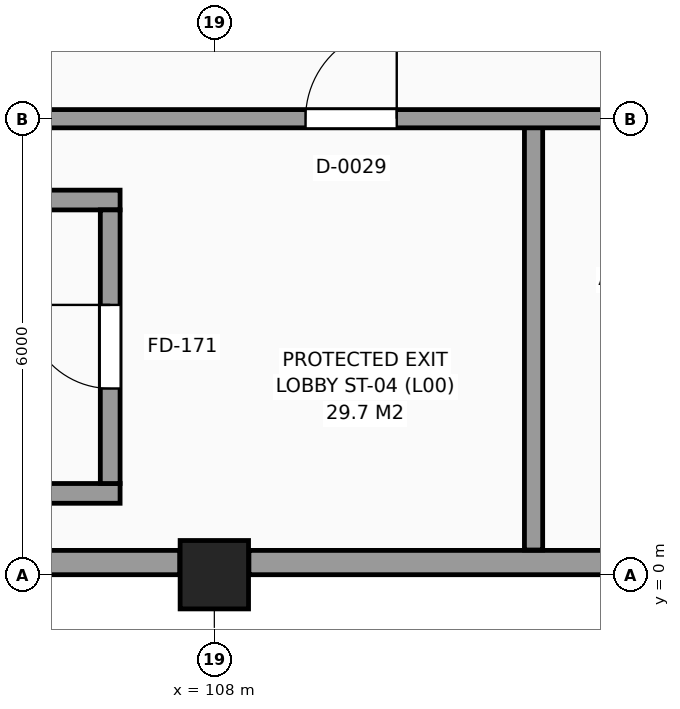
"""IFC4 building model, lengths in metres.
Left out: names, types, materials, properties, quantities, classifications, styles, units other than length and angle.
Written with IfcOpenShell. Run it as: python <this file> out.ifc"""

import sys

from ifc_helpers import new_model, si_unit, direction, frame, frame_2d, origin, origin_2d, place, context, subcontext, project, spatial, rectangle, extrude, element, fill, save


model = new_model("IFC4")
c1 = context("Model", 3, precision=1e-05, world=origin(), true_north=direction((0.0, 1.0)))
c2 = subcontext(c1, "Body", "Model", "MODEL_VIEW")
j1 = project(units=[si_unit("LENGTHUNIT", "METRE"), si_unit("PLANEANGLEUNIT", "RADIAN")], contexts=[c1])
p1 = place(None, origin())
s1 = spatial("IfcSite", under=j1, at=p1, CompositionType="ELEMENT")
p2 = place(p1, origin())
s2 = spatial("IfcBuilding", under=s1, at=p2, CompositionType="ELEMENT")
p3 = place(p2, origin())
s3 = spatial("IfcBuildingStorey", under=s2, at=p3, CompositionType="ELEMENT", Elevation=0.0)
p4 = place(p3, frame((108.0, 0.0, 0.0), z_axis=(0.0, 0.0, 1.0), x_axis=(1.0, 0.0, 0.0)))
e1 = element("IfcColumn", 1, at=p4, inside=s3, PredefinedType="COLUMN", context=c2, shape_type="SweptSolid", body=[
    extrude(rectangle(XDim=0.9, YDim=0.9, at=origin_2d()), origin(), (0.0, 0.0, 1.0), 6.0),
])
for number, where, z_axis, x_axis in (
    (2, (102.455, 0.16, 0.0), (0.0, 0.0, 1.0), (1.0, 0.0, 0.0)),
    (3, (108.455, 0.16, 0.0), (0.0, 0.0, 1.0), (1.0, 0.0, 0.0)),
):
    element("IfcWall", number, at=place(p3, frame(where, z_axis=z_axis, x_axis=x_axis)), inside=s3, PredefinedType="SOLIDWALL", context=c2, shape_type="SweptSolid", body=[
        extrude(rectangle(XDim=5.09, YDim=0.32, at=frame_2d((2.545, 0.0))), origin(), (0.0, 0.0, 1.0), 4.99),
    ])
for number, where, z_axis, x_axis in (
    (4, (96.04, 1.07, 0.0), (0.0, 0.0, 1.0), (1.0, 0.0, 0.0)),
    (5, (96.04, 4.93, 0.0), (0.0, 0.0, 1.0), (1.0, 0.0, 0.0)),
):
    element("IfcWall", number, at=place(p3, frame(where, z_axis=z_axis, x_axis=x_axis)), inside=s3, PredefinedType="SHEAR", context=c2, shape_type="SweptSolid", body=[
        extrude(rectangle(XDim=10.72, YDim=0.26, at=frame_2d((5.36, 0.0))), origin(), (0.0, 0.0, 1.0), 6.0),
    ])
p5 = place(p3, frame((106.63, 1.2, 0.0), z_axis=(0.0, 0.0, 1.0), x_axis=(0.0, 1.0, 0.0)))
e6 = element("IfcWall", 6, at=p5, inside=s3, PredefinedType="SHEAR", context=c2, shape_type="SweptSolid", body=[
    extrude(rectangle(XDim=3.6, YDim=0.26, at=frame_2d((1.8, 0.0))), origin(), (0.0, 0.0, 1.0), 6.0),
])
p6 = place(p5, frame((1.25, 0.0, 0.0)))
e7 = element("IfcOpeningElement", 7, at=p6, cuts=e6, PredefinedType="OPENING", context=c2, shape_type="SweptSolid", body=[
    extrude(rectangle(XDim=1.1, YDim=2.15, at=frame_2d((0.55, 1.075))), frame((0.0, 0.14, 0.0), z_axis=(0.0, -1.0, 0.0), x_axis=(1.0, 0.0, 0.0)), (0.0, 0.0, 1.0), 0.28),
])
p7 = place(p3, frame((112.2, 0.325, 0.0), z_axis=(0.0, 0.0, 1.0), x_axis=(0.0, 1.0, 0.0)))
e8 = element("IfcWall", 8, at=p7, inside=s3, PredefinedType="PARTITIONING", context=c2, shape_type="SweptSolid", body=[
    extrude(rectangle(XDim=5.675, YDim=0.24, at=frame_2d((2.837, 0.0))), origin(), (0.0, 0.0, 1.0), 5.74),
])
p8 = place(p3, frame((96.455, 6.0, 0.0), z_axis=(0.0, 0.0, 1.0), x_axis=(1.0, 0.0, 0.0)))
e9 = element("IfcWall", 9, at=p8, inside=s3, PredefinedType="PARTITIONING", context=c2, shape_type="SweptSolid", body=[
    extrude(rectangle(XDim=47.09, YDim=0.24, at=frame_2d((23.545, 0.0))), origin(), (0.0, 0.0, 1.0), 5.74),
])
p9 = place(p8, frame((12.745, 0.0, 0.0)))
e10 = element("IfcOpeningElement", 10, at=p9, cuts=e9, PredefinedType="OPENING", context=c2, shape_type="SweptSolid", body=[
    extrude(rectangle(XDim=1.2, YDim=2.2, at=frame_2d((0.6, 1.1))), frame((0.0, 0.13, 0.0), z_axis=(0.0, -1.0, 0.0), x_axis=(1.0, 0.0, 0.0)), (0.0, 0.0, 1.0), 0.26),
])
p10 = place(p8, frame((31.345, 0.0, 0.0)))
e11 = element("IfcOpeningElement", 11, at=p10, cuts=e9, PredefinedType="OPENING", context=c2, shape_type="SweptSolid", body=[
    extrude(rectangle(XDim=2.4, YDim=2.55, at=frame_2d((1.2, 1.275))), frame((0.0, 0.13, 0.0), z_axis=(0.0, -1.0, 0.0), x_axis=(1.0, 0.0, 0.0)), (0.0, 0.0, 1.0), 0.26),
])
p11 = place(p8, frame((0.715, 0.0, 0.0)))
e12 = element("IfcOpeningElement", 12, at=p11, cuts=e9, PredefinedType="OPENING", context=c2, shape_type="SweptSolid", body=[
    extrude(rectangle(XDim=2.4, YDim=2.55, at=frame_2d((1.2, 1.275))), frame((0.0, 0.13, 0.0), z_axis=(0.0, -1.0, 0.0), x_axis=(1.0, 0.0, 0.0)), (0.0, 0.0, 1.0), 0.26),
])
p12 = place(p6, origin())
e13 = element("IfcDoor", 13, at=p12, inside=s3, OperationType="SINGLE_SWING_RIGHT", PredefinedType="DOOR", context=c2, shape_type="SweptSolid", body=[
    extrude(rectangle(XDim=1.1, YDim=2.15, at=frame_2d((0.55, 1.075))), frame((0.0, 0.025, 0.0), z_axis=(0.0, -1.0, 0.0), x_axis=(1.0, 0.0, 0.0)), (0.0, 0.0, 1.0), 0.05),
])
fill(e7, e13)
p13 = place(p9, origin())
e14 = element("IfcDoor", 14, at=p13, inside=s3, OperationType="SINGLE_SWING_RIGHT", PredefinedType="DOOR", context=c2, shape_type="SweptSolid", body=[
    extrude(rectangle(XDim=1.2, YDim=2.2, at=frame_2d((0.6, 1.1))), frame((0.0, 0.025, 0.0), z_axis=(0.0, -1.0, 0.0), x_axis=(1.0, 0.0, 0.0)), (0.0, 0.0, 1.0), 0.05),
])
fill(e10, e14)
save(model, sys.argv[1])
